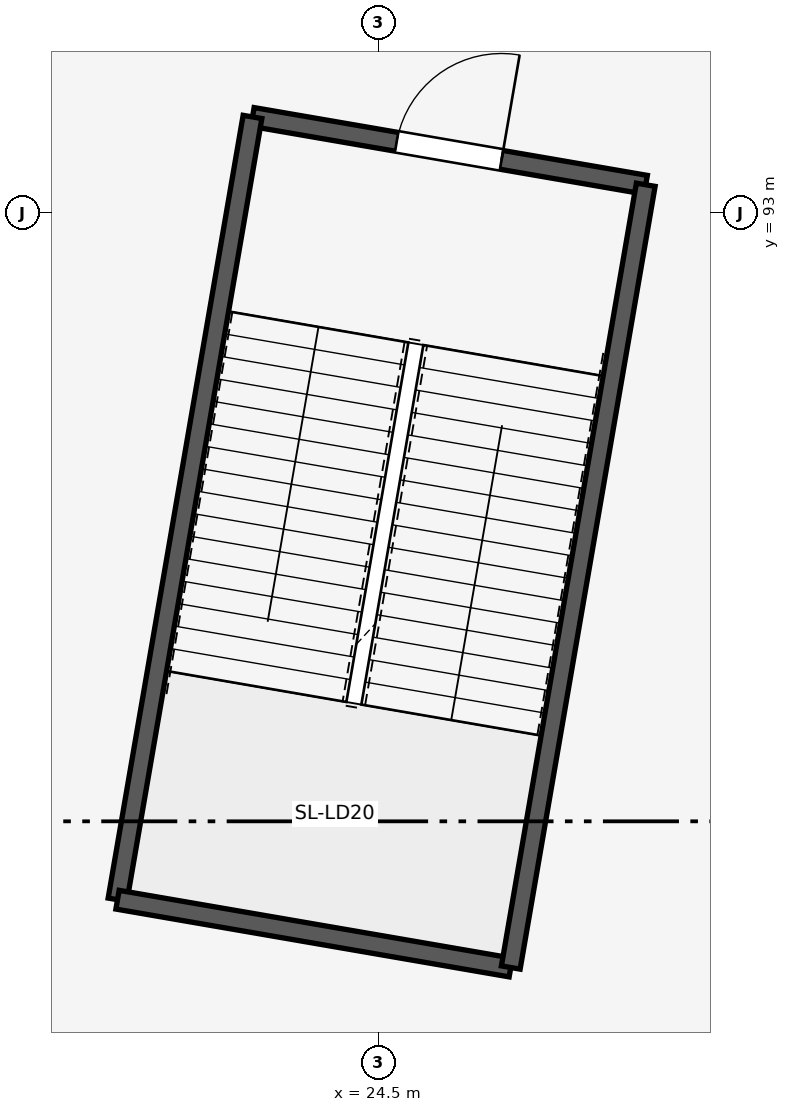
"""IFC4 building model, lengths in metres.
Left out: names, types, materials, properties, quantities, classifications, styles, units other than length and angle.
Written with IfcOpenShell. Run it as: python <this file> out.ifc"""

import sys

from ifc_helpers import new_model, si_unit, direction, frame, frame_2d, origin, place, context, subcontext, project, spatial, rectangle, extrude, element, fill, save


model = new_model("IFC4")
c1 = context("Model", 3, precision=1e-05, world=origin(), true_north=direction((0.0, 1.0)))
c2 = subcontext(c1, "Body", "Model", "MODEL_VIEW")
j1 = project(units=[si_unit("LENGTHUNIT", "METRE"), si_unit("PLANEANGLEUNIT", "RADIAN")], contexts=[c1])
p1 = place(None, origin())
s1 = spatial("IfcSite", under=j1, at=p1, CompositionType="ELEMENT")
p2 = place(p1, origin())
s2 = spatial("IfcBuilding", under=s1, at=p2, CompositionType="ELEMENT")
p3 = place(p2, origin())
s3 = spatial("IfcBuildingStorey", under=s2, at=p3, CompositionType="ELEMENT", Elevation=0.0)
p4 = place(p3, frame((28.013, 93.375, 0.0), z_axis=(0.0, 0.0, 1.0), x_axis=(-0.985457162135, 0.16992404655, 0.0)))
e1 = element("IfcWall", 1, at=p4, inside=s3, PredefinedType="SHEAR", context=c2, shape_type="SweptSolid", body=[
    extrude(rectangle(XDim=5.25, YDim=0.25, at=frame_2d((2.625, 0.0))), origin(), (0.0, 0.0, 1.0), 4.94),
])
p5 = place(p4, frame((1.925, 0.0, 0.0)))
e2 = element("IfcOpeningElement", 2, at=p5, cuts=e1, PredefinedType="OPENING", context=c2, shape_type="SweptSolid", body=[
    extrude(rectangle(XDim=1.4, YDim=2.2, at=frame_2d((0.7, 1.1))), frame((0.0, 0.135, 0.0), z_axis=(0.0, -1.0, 0.0), x_axis=(1.0, 0.0, 0.0)), (0.0, 0.0, 1.0), 0.27),
])
p6 = place(p3, frame((22.84, 94.267, 0.0), z_axis=(0.0, 0.0, 1.0), x_axis=(-0.169938992676, -0.985454584833, 0.0)))
e3 = element("IfcWall", 3, at=p6, inside=s3, PredefinedType="SHEAR", context=c2, shape_type="SweptSolid", body=[
    extrude(rectangle(XDim=10.45, YDim=0.25, at=frame_2d((5.225, 0.0))), origin(), (0.0, 0.0, 1.0), 4.94),
])
p7 = place(p3, frame((21.064, 83.969, 0.0), z_axis=(0.0, 0.0, 1.0), x_axis=(0.985458504796, -0.169916259745, 0.0)))
e4 = element("IfcWall", 4, at=p7, inside=s3, PredefinedType="SHEAR", context=c2, shape_type="SweptSolid", body=[
    extrude(rectangle(XDim=5.25, YDim=0.25, at=frame_2d((2.625, 0.0))), origin(), (0.0, 0.0, 1.0), 4.94),
])
p8 = place(p3, frame((26.238, 83.077, 0.0), z_axis=(0.0, 0.0, 1.0), x_axis=(0.16991630471, 0.985458497043, 0.0)))
e5 = element("IfcWall", 5, at=p8, inside=s3, PredefinedType="SHEAR", context=c2, shape_type="SweptSolid", body=[
    extrude(rectangle(XDim=10.45, YDim=0.25, at=frame_2d((5.225, 0.0))), origin(), (0.0, 0.0, 1.0), 4.94),
])
p9 = place(p5, frame((1.4, 0.0, 0.0), z_axis=(0.0, 0.0, 1.0), x_axis=(-1.0, 0.0, 0.0)))
e6 = element("IfcDoor", 6, at=p9, inside=s3, OperationType="SINGLE_SWING_RIGHT", PredefinedType="DOOR", context=c2, shape_type="SweptSolid", body=[
    extrude(rectangle(XDim=1.4, YDim=2.2, at=frame_2d((0.7, 1.1))), frame((0.0, 0.025, 0.0), z_axis=(0.0, -1.0, 0.0), x_axis=(1.0, 0.0, 0.0)), (0.0, 0.0, 1.0), 0.05),
])
fill(e2, e6)
save(model, sys.argv[1])
